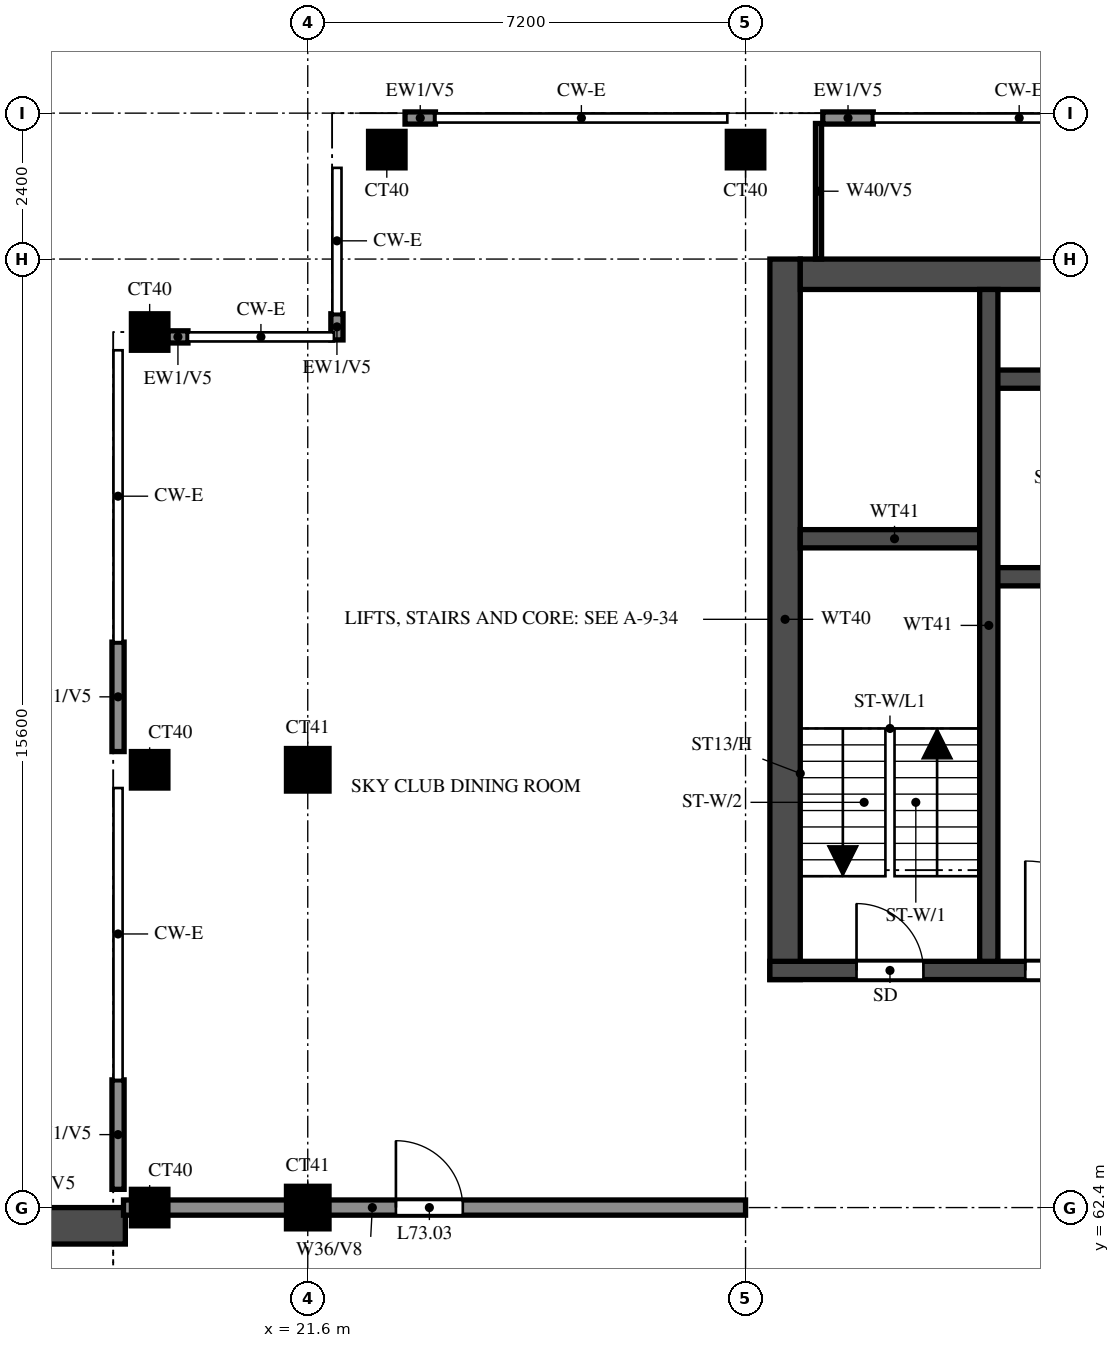
"""IFC4 building model, lengths in metres.
Left out: names, types, materials, properties, quantities, classifications, styles, units other than length and angle.
Written with IfcOpenShell. Run it as: python <this file> out.ifc"""

import sys

from ifc_helpers import new_model, si_unit, direction, frame, frame_2d, origin, origin_2d, place, context, subcontext, project, spatial, rectangle, extrude, source, transform, mapped, element, fill, save


model = new_model("IFC4")
c1 = context("Model", 3, precision=1e-05, world=origin(), true_north=direction((0.0, 1.0)))
c2 = subcontext(c1, "Body", "Model", "MODEL_VIEW")
j1 = project(units=[si_unit("LENGTHUNIT", "METRE"), si_unit("PLANEANGLEUNIT", "RADIAN")], contexts=[c1])
p1 = place(None, origin())
s1 = spatial("IfcSite", under=j1, at=p1, CompositionType="ELEMENT")
p2 = place(p1, origin())
s2 = spatial("IfcBuilding", under=s1, at=p2, CompositionType="ELEMENT")
p3 = place(p2, frame((0.0, 0.0, 271.0)))
s3 = spatial("IfcBuildingStorey", under=s2, at=p3, CompositionType="ELEMENT", Elevation=271.0)
m1 = source(origin(), c2, "Body", "SweptSolid", [
    extrude(rectangle(XDim=0.6, YDim=0.6, at=origin_2d()), origin(), (0.0, 0.0, 1.0), 3.15),
])
p4 = place(p3, frame((19.0, 62.4, 0.0), z_axis=(0.0, 0.0, 1.0), x_axis=(1.0, 0.0, 0.0)))
e1 = element("IfcColumn", 1, at=p4, inside=s3, PredefinedType="COLUMN", context=c2, shape_type="MappedRepresentation", body=[
    mapped(m1, transform((0.0, 0.0, 0.0))),
])
m2 = source(origin(), c2, "Body", "SweptSolid", [
    extrude(rectangle(XDim=0.7, YDim=0.7, at=origin_2d()), origin(), (0.0, 0.0, 1.0), 3.15),
])
p5 = place(p3, frame((21.6, 62.4, 0.0), z_axis=(0.0, 0.0, 1.0), x_axis=(1.0, 0.0, 0.0)))
e2 = element("IfcColumn", 2, at=p5, inside=s3, PredefinedType="COLUMN", context=c2, shape_type="MappedRepresentation", body=[
    mapped(m2, transform((0.0, 0.0, 0.0))),
])
p6 = place(p3, frame((19.0, 69.6, 0.0), z_axis=(0.0, 0.0, 1.0), x_axis=(1.0, 0.0, 0.0)))
e3 = element("IfcColumn", 3, at=p6, inside=s3, PredefinedType="COLUMN", context=c2, shape_type="MappedRepresentation", body=[
    mapped(m1, transform((0.0, 0.0, 0.0))),
])
p7 = place(p3, frame((21.6, 69.6, 0.0), z_axis=(0.0, 0.0, 1.0), x_axis=(1.0, 0.0, 0.0)))
e4 = element("IfcColumn", 4, at=p7, inside=s3, PredefinedType="COLUMN", context=c2, shape_type="MappedRepresentation", body=[
    mapped(m2, transform((0.0, 0.0, 0.0))),
])
for number, where, z_axis, x_axis in (
    (5, (19.0, 76.8, 0.0), (0.0, 0.0, 1.0), (1.0, 0.0, 0.0)),
    (6, (22.9, 79.8, 0.0), (0.0, 0.0, 1.0), (1.0, 0.0, 0.0)),
    (7, (28.8, 79.8, 0.0), (0.0, 0.0, 1.0), (1.0, 0.0, 0.0)),
):
    element("IfcColumn", number, at=place(p3, frame(where, z_axis=z_axis, x_axis=x_axis)), inside=s3, PredefinedType="COLUMN", context=c2, shape_type="MappedRepresentation", body=[
        mapped(m1, transform((0.0, 0.0, 0.0))),
    ])
p8 = place(p3, frame((29.45, 66.15, 0.0), z_axis=(0.0, 0.0, 1.0), x_axis=(0.0, 1.0, 0.0)))
e8 = element("IfcWall", 8, at=p8, inside=s3, PredefinedType="SHEAR", context=c2, shape_type="SweptSolid", body=[
    extrude(rectangle(XDim=11.85, YDim=0.5, at=frame_2d((5.925, 0.0))), origin(), (0.0, 0.0, 1.0), 3.15),
])
p9 = place(p3, frame((29.7, 77.75, 0.0), z_axis=(0.0, 0.0, 1.0), x_axis=(1.0, 0.0, 0.0)))
e9 = element("IfcWall", 9, at=p9, inside=s3, PredefinedType="SHEAR", context=c2, shape_type="SweptSolid", body=[
    extrude(rectangle(XDim=41.4, YDim=0.5, at=frame_2d((20.7, 0.0))), origin(), (0.0, 0.0, 1.0), 3.15),
])
p10 = place(p3, frame((29.2, 66.3, 0.0), z_axis=(0.0, 0.0, 1.0), x_axis=(1.0, 0.0, 0.0)))
e10 = element("IfcWall", 10, at=p10, inside=s3, PredefinedType="SHEAR", context=c2, shape_type="SweptSolid", body=[
    extrude(rectangle(XDim=42.4, YDim=0.3, at=frame_2d((21.2, 0.0))), origin(), (0.0, 0.0, 1.0), 3.15),
])
p11 = place(p10, frame((1.425, 0.0, 0.0)))
e11 = element("IfcOpeningElement", 11, at=p11, cuts=e10, PredefinedType="OPENING", context=c2, shape_type="SweptSolid", body=[
    extrude(rectangle(XDim=1.1, YDim=2.1, at=frame_2d((0.55, 1.05))), frame((0.0, 0.16, 0.0), z_axis=(0.0, -1.0, 0.0), x_axis=(1.0, 0.0, 0.0)), (0.0, 0.0, 1.0), 0.32),
])
p12 = place(p10, frame((4.2, 0.0, 0.0)))
e12 = element("IfcOpeningElement", 12, at=p12, cuts=e10, PredefinedType="OPENING", context=c2, shape_type="SweptSolid", body=[
    extrude(rectangle(XDim=1.8, YDim=2.1, at=frame_2d((0.9, 1.05))), frame((0.0, 0.16, 0.0), z_axis=(0.0, -1.0, 0.0), x_axis=(1.0, 0.0, 0.0)), (0.0, 0.0, 1.0), 0.32),
])
p13 = place(p3, frame((32.8, 72.775, 0.0), z_axis=(0.0, 0.0, 1.0), x_axis=(1.0, 0.0, 0.0)))
e13 = element("IfcWall", 13, at=p13, inside=s3, PredefinedType="SHEAR", context=c2, shape_type="SweptSolid", body=[
    extrude(rectangle(XDim=35.2, YDim=0.3, at=frame_2d((17.6, 0.0))), origin(), (0.0, 0.0, 1.0), 3.15),
])
p14 = place(p13, frame((19.8, 0.0, 0.0)))
e14 = element("IfcOpeningElement", 14, at=p14, cuts=e13, PredefinedType="OPENING", context=c2, shape_type="SweptSolid", body=[
    extrude(rectangle(XDim=1.1, YDim=2.1, at=frame_2d((0.55, 1.05))), frame((0.0, 0.16, 0.0), z_axis=(0.0, -1.0, 0.0), x_axis=(1.0, 0.0, 0.0)), (0.0, 0.0, 1.0), 0.32),
])
p15 = place(p13, frame((27.725, 0.0, 0.0)))
e15 = element("IfcOpeningElement", 15, at=p15, cuts=e13, PredefinedType="OPENING", context=c2, shape_type="SweptSolid", body=[
    extrude(rectangle(XDim=1.1, YDim=2.1, at=frame_2d((0.55, 1.05))), frame((0.0, 0.16, 0.0), z_axis=(0.0, -1.0, 0.0), x_axis=(1.0, 0.0, 0.0)), (0.0, 0.0, 1.0), 0.32),
])
p16 = place(p13, frame((30.325, 0.0, 0.0)))
e16 = element("IfcOpeningElement", 16, at=p16, cuts=e13, PredefinedType="OPENING", context=c2, shape_type="SweptSolid", body=[
    extrude(rectangle(XDim=1.1, YDim=2.1, at=frame_2d((0.55, 1.05))), frame((0.0, 0.16, 0.0), z_axis=(0.0, -1.0, 0.0), x_axis=(1.0, 0.0, 0.0)), (0.0, 0.0, 1.0), 0.32),
])
p17 = place(p13, frame((3.825, 0.0, 0.0)))
e17 = element("IfcOpeningElement", 17, at=p17, cuts=e13, PredefinedType="OPENING", context=c2, shape_type="SweptSolid", body=[
    extrude(rectangle(XDim=1.1, YDim=2.1, at=frame_2d((0.55, 1.05))), frame((0.0, 0.16, 0.0), z_axis=(0.0, -1.0, 0.0), x_axis=(1.0, 0.0, 0.0)), (0.0, 0.0, 1.0), 0.32),
])
p18 = place(p13, frame((6.575, 0.0, 0.0)))
e18 = element("IfcOpeningElement", 18, at=p18, cuts=e13, PredefinedType="OPENING", context=c2, shape_type="SweptSolid", body=[
    extrude(rectangle(XDim=1.1, YDim=2.1, at=frame_2d((0.55, 1.05))), frame((0.0, 0.16, 0.0), z_axis=(0.0, -1.0, 0.0), x_axis=(1.0, 0.0, 0.0)), (0.0, 0.0, 1.0), 0.32),
])
p19 = place(p13, frame((9.325, 0.0, 0.0)))
e19 = element("IfcOpeningElement", 19, at=p19, cuts=e13, PredefinedType="OPENING", context=c2, shape_type="SweptSolid", body=[
    extrude(rectangle(XDim=1.1, YDim=2.1, at=frame_2d((0.55, 1.05))), frame((0.0, 0.16, 0.0), z_axis=(0.0, -1.0, 0.0), x_axis=(1.0, 0.0, 0.0)), (0.0, 0.0, 1.0), 0.32),
])
p20 = place(p13, frame((12.075, 0.0, 0.0)))
e20 = element("IfcOpeningElement", 20, at=p20, cuts=e13, PredefinedType="OPENING", context=c2, shape_type="SweptSolid", body=[
    extrude(rectangle(XDim=1.1, YDim=2.1, at=frame_2d((0.55, 1.05))), frame((0.0, 0.16, 0.0), z_axis=(0.0, -1.0, 0.0), x_axis=(1.0, 0.0, 0.0)), (0.0, 0.0, 1.0), 0.32),
])
p21 = place(p13, frame((14.825, 0.0, 0.0)))
e21 = element("IfcOpeningElement", 21, at=p21, cuts=e13, PredefinedType="OPENING", context=c2, shape_type="SweptSolid", body=[
    extrude(rectangle(XDim=1.1, YDim=2.1, at=frame_2d((0.55, 1.05))), frame((0.0, 0.16, 0.0), z_axis=(0.0, -1.0, 0.0), x_axis=(1.0, 0.0, 0.0)), (0.0, 0.0, 1.0), 0.32),
])
p22 = place(p13, frame((17.575, 0.0, 0.0)))
e22 = element("IfcOpeningElement", 22, at=p22, cuts=e13, PredefinedType="OPENING", context=c2, shape_type="SweptSolid", body=[
    extrude(rectangle(XDim=1.1, YDim=2.1, at=frame_2d((0.55, 1.05))), frame((0.0, 0.16, 0.0), z_axis=(0.0, -1.0, 0.0), x_axis=(1.0, 0.0, 0.0)), (0.0, 0.0, 1.0), 0.32),
])
p23 = place(p13, frame((0.95, 0.0, 0.0)))
e23 = element("IfcOpeningElement", 23, at=p23, cuts=e13, PredefinedType="OPENING", context=c2, shape_type="SweptSolid", body=[
    extrude(rectangle(XDim=1.1, YDim=2.1, at=frame_2d((0.55, 1.05))), frame((0.0, 0.16, 0.0), z_axis=(0.0, -1.0, 0.0), x_axis=(1.0, 0.0, 0.0)), (0.0, 0.0, 1.0), 0.32),
])
p24 = place(p3, frame((32.8, 76.025, 0.0), z_axis=(0.0, 0.0, 1.0), x_axis=(1.0, 0.0, 0.0)))
e24 = element("IfcWall", 24, at=p24, inside=s3, PredefinedType="SHEAR", context=c2, shape_type="SweptSolid", body=[
    extrude(rectangle(XDim=35.2, YDim=0.3, at=frame_2d((17.6, 0.0))), origin(), (0.0, 0.0, 1.0), 3.15),
])
p25 = place(p3, frame((29.7, 73.4, 0.0), z_axis=(0.0, 0.0, 1.0), x_axis=(1.0, 0.0, 0.0)))
e25 = element("IfcWall", 25, at=p25, inside=s3, PredefinedType="SHEAR", context=c2, shape_type="SweptSolid", body=[
    extrude(rectangle(XDim=3.1, YDim=0.3, at=frame_2d((1.55, 0.0))), origin(), (0.0, 0.0, 1.0), 3.15),
])
p26 = place(p3, frame((32.8, 66.45, 0.0), z_axis=(0.0, 0.0, 1.0), x_axis=(0.0, 1.0, 0.0)))
e26 = element("IfcWall", 26, at=p26, inside=s3, PredefinedType="SHEAR", context=c2, shape_type="SweptSolid", body=[
    extrude(rectangle(XDim=11.05, YDim=0.3, at=frame_2d((5.525, 0.0))), origin(), (0.0, 0.0, 1.0), 3.15),
])
p27 = place(p3, frame((30.9, 80.32, 0.0), z_axis=(0.0, 0.0, 1.0), x_axis=(-1.0, 0.0, 0.0)))
e27 = element("IfcWall", 27, at=p27, inside=s3, PredefinedType="SOLIDWALL", context=c2, shape_type="SweptSolid", body=[
    extrude(rectangle(XDim=0.83, YDim=0.2, at=frame_2d((0.415, 0.0))), origin(), (0.0, 0.0, 1.0), 3.15),
])
p28 = place(p3, frame((23.7, 80.32, 0.0), z_axis=(0.0, 0.0, 1.0), x_axis=(-1.0, 0.0, 0.0)))
e28 = element("IfcWall", 28, at=p28, inside=s3, PredefinedType="SOLIDWALL", context=c2, shape_type="SweptSolid", body=[
    extrude(rectangle(XDim=0.5, YDim=0.2, at=frame_2d((0.25, 0.0))), origin(), (0.0, 0.0, 1.0), 3.15),
])
p29 = place(p3, frame((22.08, 77.1, 0.0), z_axis=(0.0, 0.0, 1.0), x_axis=(0.0, -1.0, 0.0)))
e29 = element("IfcWall", 29, at=p29, inside=s3, PredefinedType="SOLIDWALL", context=c2, shape_type="SweptSolid", body=[
    extrude(rectangle(XDim=0.43, YDim=0.2, at=frame_2d((0.215, 0.0))), origin(), (0.0, 0.0, 1.0), 3.15),
])
p30 = place(p3, frame((19.63, 76.72, 0.0), z_axis=(0.0, 0.0, 1.0), x_axis=(-1.0, 0.0, 0.0)))
e30 = element("IfcWall", 30, at=p30, inside=s3, PredefinedType="SOLIDWALL", context=c2, shape_type="SweptSolid", body=[
    extrude(rectangle(XDim=0.33, YDim=0.2, at=frame_2d((0.165, 0.0))), origin(), (0.0, 0.0, 1.0), 3.15),
])
for number, where, z_axis, x_axis in (
    (31, (18.48, 71.7, 0.0), (0.0, 0.0, 1.0), (0.0, -1.0, 0.0)),
    (32, (18.48, 64.5, 0.0), (0.0, 0.0, 1.0), (0.0, -1.0, 0.0)),
):
    element("IfcWall", number, at=place(p3, frame(where, z_axis=z_axis, x_axis=x_axis)), inside=s3, PredefinedType="SOLIDWALL", context=c2, shape_type="SweptSolid", body=[
        extrude(rectangle(XDim=1.8, YDim=0.2, at=frame_2d((0.9, 0.0))), origin(), (0.0, 0.0, 1.0), 3.15),
    ])
p31 = place(p3, frame((18.6, 62.1, 0.0), z_axis=(0.0, 0.0, 1.0), x_axis=(-1.0, 0.0, 0.0)))
e33 = element("IfcWall", 33, at=p31, inside=s3, PredefinedType="SOLIDWALL", context=c2, shape_type="SweptSolid", body=[
    extrude(rectangle(XDim=2.9, YDim=0.6, at=frame_2d((1.45, 0.0))), origin(), (0.0, 0.0, 1.0), 2.901),
])
p32 = place(p3, frame((18.57, 62.4, 0.0), z_axis=(0.0, 0.0, 1.0), x_axis=(1.0, 0.0, 0.0)))
e34 = element("IfcWall", 34, at=p32, inside=s3, PredefinedType="SOLIDWALL", context=c2, shape_type="SweptSolid", body=[
    extrude(rectangle(XDim=10.23, YDim=0.25, at=frame_2d((5.115, 0.0))), origin(), (0.0, 0.0, 1.0), 3.15),
])
p33 = place(p32, frame((4.48, 0.0, 0.0)))
e35 = element("IfcOpeningElement", 35, at=p33, cuts=e34, PredefinedType="OPENING", context=c2, shape_type="SweptSolid", body=[
    extrude(rectangle(XDim=1.1, YDim=2.1, at=frame_2d((0.55, 1.05))), frame((0.0, 0.135, 0.0), z_axis=(0.0, -1.0, 0.0), x_axis=(1.0, 0.0, 0.0)), (0.0, 0.0, 1.0), 0.27),
])
p34 = place(p3, frame((30.0, 78.002, 0.0), z_axis=(0.0, 0.0, 1.0), x_axis=(0.0, 1.0, 0.0)))
e36 = element("IfcWall", 36, at=p34, inside=s3, PredefinedType="PARTITIONING", context=c2, shape_type="SweptSolid", body=[
    extrude(rectangle(XDim=2.228, YDim=0.1, at=frame_2d((1.114, 0.0))), origin(), (0.0, 0.0, 1.0), 2.25),
])
p35 = place(p11, origin())
e37 = element("IfcDoor", 37, at=p35, inside=s3, OperationType="SINGLE_SWING_LEFT", PredefinedType="DOOR", context=c2, shape_type="SweptSolid", body=[
    extrude(rectangle(XDim=1.1, YDim=2.1, at=frame_2d((0.55, 1.05))), frame((0.0, 0.025, 0.0), z_axis=(0.0, -1.0, 0.0), x_axis=(1.0, 0.0, 0.0)), (0.0, 0.0, 1.0), 0.05),
])
fill(e11, e37)
p36 = place(p12, origin())
e38 = element("IfcDoor", 38, at=p36, inside=s3, OperationType="DOUBLE_DOOR_SINGLE_SWING", PredefinedType="DOOR", context=c2, shape_type="SweptSolid", body=[
    extrude(rectangle(XDim=1.8, YDim=2.1, at=frame_2d((0.9, 1.05))), frame((0.0, 0.025, 0.0), z_axis=(0.0, -1.0, 0.0), x_axis=(1.0, 0.0, 0.0)), (0.0, 0.0, 1.0), 0.05),
])
fill(e12, e38)
p37 = place(p33, origin())
e39 = element("IfcDoor", 39, at=p37, inside=s3, OperationType="SINGLE_SWING_LEFT", PredefinedType="DOOR", context=c2, shape_type="SweptSolid", body=[
    extrude(rectangle(XDim=1.1, YDim=2.1, at=frame_2d((0.55, 1.05))), frame((0.0, 0.025, 0.0), z_axis=(0.0, -1.0, 0.0), x_axis=(1.0, 0.0, 0.0)), (0.0, 0.0, 1.0), 0.05),
])
fill(e35, e39)
save(model, sys.argv[1])
